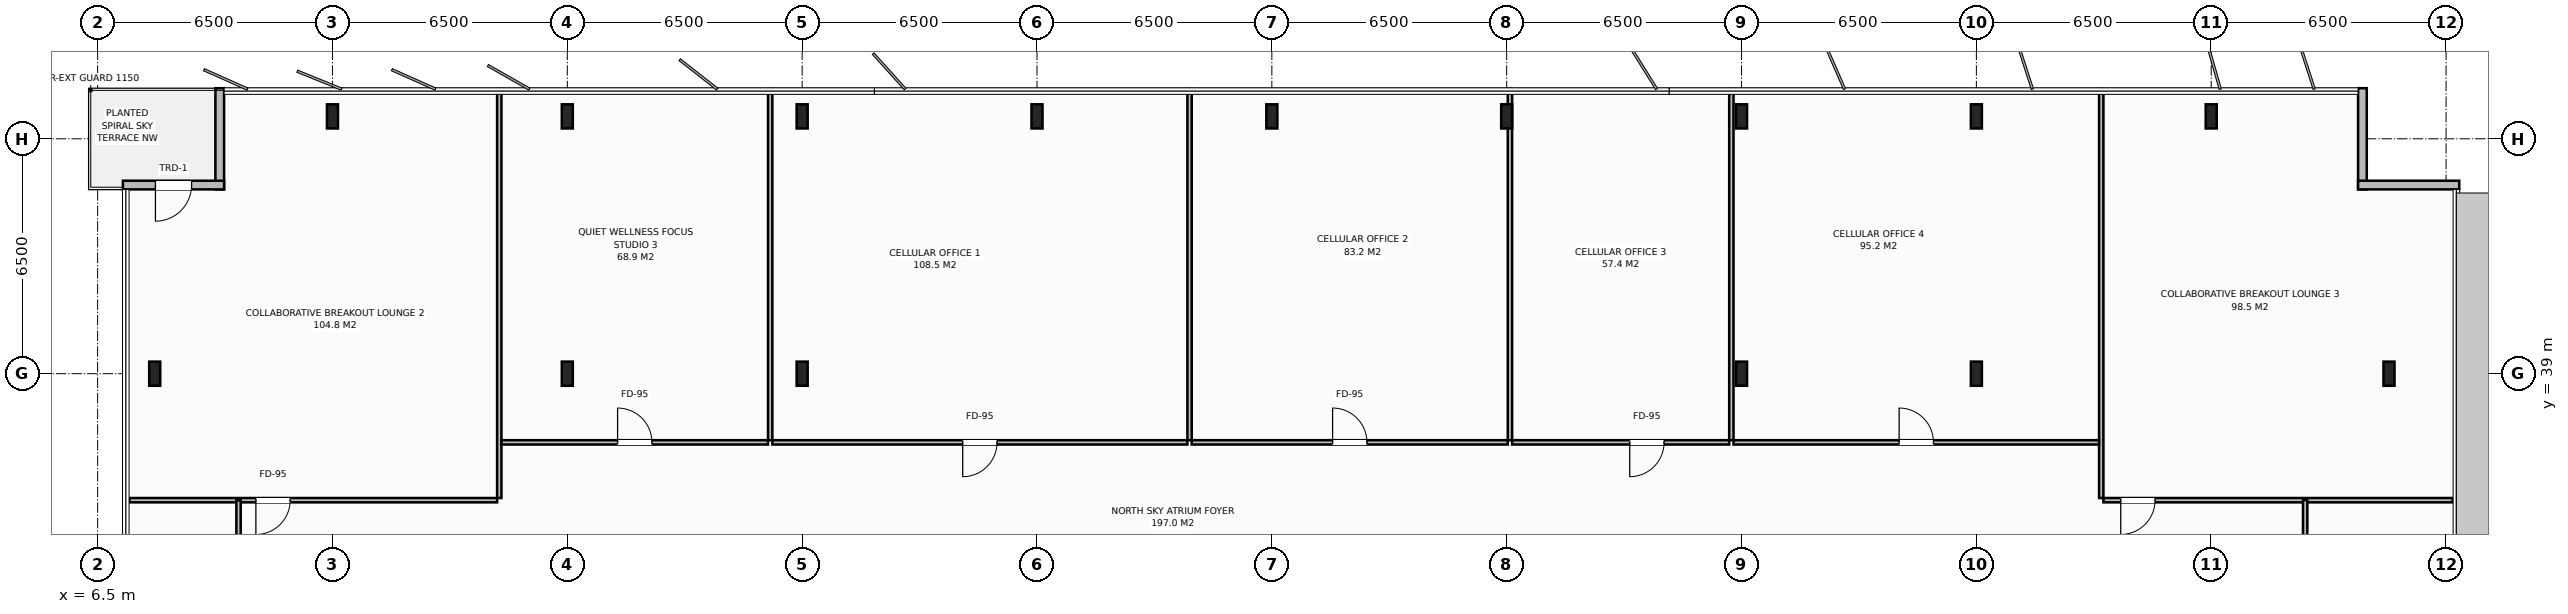
"""IFC4 building model, lengths in metres.
Left out: names, types, materials, properties, quantities, classifications, styles, units other than length and angle.
Written with IfcOpenShell. Run it as: python <this file> out.ifc"""

import sys

from ifc_helpers import new_model, si_unit, direction, frame, frame_2d, origin, origin_2d, place, context, subcontext, project, spatial, rectangle, i_section, extrude, element, fill, save


model = new_model("IFC4")
c1 = context("Model", 3, precision=1e-05, world=origin(), true_north=direction((0.0, 1.0)))
c2 = subcontext(c1, "Body", "Model", "MODEL_VIEW")
j1 = project(units=[si_unit("LENGTHUNIT", "METRE"), si_unit("PLANEANGLEUNIT", "RADIAN")], contexts=[c1])
p1 = place(None, origin())
s1 = spatial("IfcSite", under=j1, at=p1, CompositionType="ELEMENT")
p2 = place(p1, origin())
s2 = spatial("IfcBuilding", under=s1, at=p2, CompositionType="ELEMENT")
p3 = place(p2, frame((0.0, 0.0, 274.6)))
s3 = spatial("IfcBuildingStorey", under=s2, at=p3, CompositionType="ELEMENT", Elevation=274.6)
for number, where, z_axis, x_axis in (
    (1, (19.5, 39.0, 0.0), (0.0, 0.0, 1.0), (1.0, 0.0, 0.0)),
    (2, (58.5, 39.0, 0.0), (0.0, 0.0, 1.0), (1.0, 0.0, 0.0)),
    (3, (26.0, 39.0, 0.0), (0.0, 0.0, 1.0), (1.0, 0.0, 0.0)),
    (4, (52.0, 39.0, 0.0), (0.0, 0.0, 1.0), (1.0, 0.0, 0.0)),
    (5, (13.0, 46.12, 0.0), (0.0, 0.0, 1.0), (1.0, 0.0, 0.0)),
    (6, (19.5, 46.12, 0.0), (0.0, 0.0, 1.0), (1.0, 0.0, 0.0)),
    (7, (26.0, 46.12, 0.0), (0.0, 0.0, 1.0), (1.0, 0.0, 0.0)),
    (8, (32.5, 46.12, 0.0), (0.0, 0.0, 1.0), (1.0, 0.0, 0.0)),
    (9, (39.0, 46.12, 0.0), (0.0, 0.0, 1.0), (1.0, 0.0, 0.0)),
    (10, (45.5, 46.12, 0.0), (0.0, 0.0, 1.0), (1.0, 0.0, 0.0)),
    (11, (52.0, 46.12, 0.0), (0.0, 0.0, 1.0), (1.0, 0.0, 0.0)),
    (12, (58.5, 46.12, 0.0), (0.0, 0.0, 1.0), (1.0, 0.0, 0.0)),
    (13, (65.0, 46.12, 0.0), (0.0, 0.0, 1.0), (1.0, 0.0, 0.0)),
    (14, (8.08, 39.0, 0.0), (0.0, 0.0, 1.0), (1.0, 0.0, 0.0)),
    (15, (69.92, 39.0, 0.0), (0.0, 0.0, 1.0), (1.0, 0.0, 0.0)),
):
    element("IfcColumn", number, at=place(p3, frame(where, z_axis=z_axis, x_axis=x_axis)), inside=s3, PredefinedType="COLUMN", context=c2, shape_type="SweptSolid", body=[
        extrude(i_section(OverallWidth=0.305, OverallDepth=0.668, WebThickness=0.021, FlangeThickness=0.04, at=origin_2d()), origin(), (0.0, 0.0, 1.0), 3.8),
    ])
p4 = place(p3, frame((9.88, 44.1, 0.0), z_axis=(0.0, 0.0, 1.0), x_axis=(0.0, 1.0, 0.0)))
e16 = element("IfcWall", 16, at=p4, inside=s3, PredefinedType="STANDARD", context=c2, shape_type="SweptSolid", body=[
    extrude(rectangle(XDim=2.8, YDim=0.24, at=frame_2d((1.4, 0.0))), origin(), (0.0, 0.0, 1.0), 3.588),
])
p5 = place(p3, frame((7.2, 44.22, 0.0), z_axis=(0.0, 0.0, 1.0), x_axis=(1.0, 0.0, 0.0)))
e17 = element("IfcWall", 17, at=p5, inside=s3, PredefinedType="STANDARD", context=c2, shape_type="SweptSolid", body=[
    extrude(rectangle(XDim=2.8, YDim=0.24, at=frame_2d((1.4, 0.0))), origin(), (0.0, 0.0, 1.0), 3.588),
])
p6 = place(p5, frame((0.9, 0.0, 0.0)))
e18 = element("IfcOpeningElement", 18, at=p6, cuts=e17, PredefinedType="OPENING", context=c2, shape_type="SweptSolid", body=[
    extrude(rectangle(XDim=1.0, YDim=2.2, at=frame_2d((0.5, 1.1))), frame((0.0, 0.13, 0.0), z_axis=(0.0, -1.0, 0.0), x_axis=(1.0, 0.0, 0.0)), (0.0, 0.0, 1.0), 0.26),
])
p7 = place(p3, frame((69.185, 46.9, 0.0), z_axis=(0.0, 0.0, 1.0), x_axis=(0.0, -1.0, 0.0)))
e19 = element("IfcWall", 19, at=p7, inside=s3, PredefinedType="STANDARD", context=c2, shape_type="SweptSolid", body=[
    extrude(rectangle(XDim=2.8, YDim=0.24, at=frame_2d((1.4, 0.0))), origin(), (0.0, 0.0, 1.0), 3.588),
])
p8 = place(p3, frame((69.065, 44.22, 0.0), z_axis=(0.0, 0.0, 1.0), x_axis=(1.0, 0.0, 0.0)))
e20 = element("IfcWall", 20, at=p8, inside=s3, PredefinedType="STANDARD", context=c2, shape_type="SweptSolid", body=[
    extrude(rectangle(XDim=2.8, YDim=0.24, at=frame_2d((1.4, 0.0))), origin(), (0.0, 0.0, 1.0), 3.588),
])
p9 = place(p3, frame((17.617, 35.56, 0.0), z_axis=(0.0, 0.0, 1.0), x_axis=(0.0, 1.0, 0.0)))
e21 = element("IfcWall", 21, at=p9, inside=s3, PredefinedType="PARTITIONING", context=c2, shape_type="SweptSolid", body=[
    extrude(rectangle(XDim=11.32, YDim=0.12, at=frame_2d((5.66, 0.0))), origin(), (0.0, 0.0, 1.0), 3.588),
])
p10 = place(p3, frame((7.38, 35.5, 0.0), z_axis=(0.0, 0.0, 1.0), x_axis=(1.0, 0.0, 0.0)))
e22 = element("IfcWall", 22, at=p10, inside=s3, PredefinedType="PARTITIONING", context=c2, shape_type="SweptSolid", body=[
    extrude(rectangle(XDim=10.177, YDim=0.12, at=frame_2d((5.089, 0.0))), origin(), (0.0, 0.0, 1.0), 3.588),
])
p11 = place(p10, frame((3.5, 0.0, 0.0)))
e23 = element("IfcOpeningElement", 23, at=p11, cuts=e22, PredefinedType="OPENING", context=c2, shape_type="SweptSolid", body=[
    extrude(rectangle(XDim=0.95, YDim=2.15, at=frame_2d((0.475, 1.075))), frame((0.0, 0.07, 0.0), z_axis=(0.0, -1.0, 0.0), x_axis=(1.0, 0.0, 0.0)), (0.0, 0.0, 1.0), 0.14),
])
p12 = place(p3, frame((25.115, 37.16, 0.0), z_axis=(0.0, 0.0, 1.0), x_axis=(0.0, 1.0, 0.0)))
e24 = element("IfcWall", 24, at=p12, inside=s3, PredefinedType="PARTITIONING", context=c2, shape_type="SweptSolid", body=[
    extrude(rectangle(XDim=9.72, YDim=0.12, at=frame_2d((4.86, 0.0))), origin(), (0.0, 0.0, 1.0), 3.588),
])
p13 = place(p3, frame((17.677, 37.1, 0.0), z_axis=(0.0, 0.0, 1.0), x_axis=(1.0, 0.0, 0.0)))
e25 = element("IfcWall", 25, at=p13, inside=s3, PredefinedType="PARTITIONING", context=c2, shape_type="SweptSolid", body=[
    extrude(rectangle(XDim=7.378, YDim=0.12, at=frame_2d((3.689, 0.0))), origin(), (0.0, 0.0, 1.0), 3.588),
])
p14 = place(p13, frame((3.214, 0.0, 0.0)))
e26 = element("IfcOpeningElement", 26, at=p14, cuts=e25, PredefinedType="OPENING", context=c2, shape_type="SweptSolid", body=[
    extrude(rectangle(XDim=0.95, YDim=2.15, at=frame_2d((0.475, 1.075))), frame((0.0, 0.07, 0.0), z_axis=(0.0, -1.0, 0.0), x_axis=(1.0, 0.0, 0.0)), (0.0, 0.0, 1.0), 0.14),
])
p15 = place(p3, frame((36.722, 37.16, 0.0), z_axis=(0.0, 0.0, 1.0), x_axis=(0.0, 1.0, 0.0)))
e27 = element("IfcWall", 27, at=p15, inside=s3, PredefinedType="PARTITIONING", context=c2, shape_type="SweptSolid", body=[
    extrude(rectangle(XDim=9.72, YDim=0.12, at=frame_2d((4.86, 0.0))), origin(), (0.0, 0.0, 1.0), 3.588),
])
p16 = place(p3, frame((25.175, 37.1, 0.0), z_axis=(0.0, 0.0, 1.0), x_axis=(1.0, 0.0, 0.0)))
e28 = element("IfcWall", 28, at=p16, inside=s3, PredefinedType="PARTITIONING", context=c2, shape_type="SweptSolid", body=[
    extrude(rectangle(XDim=11.487, YDim=0.12, at=frame_2d((5.744, 0.0))), origin(), (0.0, 0.0, 1.0), 3.588),
])
p17 = place(p16, frame((5.269, 0.0, 0.0)))
e29 = element("IfcOpeningElement", 29, at=p17, cuts=e28, PredefinedType="OPENING", context=c2, shape_type="SweptSolid", body=[
    extrude(rectangle(XDim=0.95, YDim=2.15, at=frame_2d((0.475, 1.075))), frame((0.0, 0.07, 0.0), z_axis=(0.0, -1.0, 0.0), x_axis=(1.0, 0.0, 0.0)), (0.0, 0.0, 1.0), 0.14),
])
p18 = place(p3, frame((45.59, 37.16, 0.0), z_axis=(0.0, 0.0, 1.0), x_axis=(0.0, 1.0, 0.0)))
e30 = element("IfcWall", 30, at=p18, inside=s3, PredefinedType="PARTITIONING", context=c2, shape_type="SweptSolid", body=[
    extrude(rectangle(XDim=9.72, YDim=0.12, at=frame_2d((4.86, 0.0))), origin(), (0.0, 0.0, 1.0), 2.788),
])
p19 = place(p3, frame((36.782, 37.1, 0.0), z_axis=(0.0, 0.0, 1.0), x_axis=(1.0, 0.0, 0.0)))
e31 = element("IfcWall", 31, at=p19, inside=s3, PredefinedType="PARTITIONING", context=c2, shape_type="SweptSolid", body=[
    extrude(rectangle(XDim=8.748, YDim=0.12, at=frame_2d((4.374, 0.0))), origin(), (0.0, 0.0, 1.0), 3.588),
])
p20 = place(p19, frame((3.899, 0.0, 0.0)))
e32 = element("IfcOpeningElement", 32, at=p20, cuts=e31, PredefinedType="OPENING", context=c2, shape_type="SweptSolid", body=[
    extrude(rectangle(XDim=0.95, YDim=2.15, at=frame_2d((0.475, 1.075))), frame((0.0, 0.07, 0.0), z_axis=(0.0, -1.0, 0.0), x_axis=(1.0, 0.0, 0.0)), (0.0, 0.0, 1.0), 0.14),
])
p21 = place(p3, frame((51.718, 37.16, 0.0), z_axis=(0.0, 0.0, 1.0), x_axis=(0.0, 1.0, 0.0)))
e33 = element("IfcWall", 33, at=p21, inside=s3, PredefinedType="PARTITIONING", context=c2, shape_type="SweptSolid", body=[
    extrude(rectangle(XDim=9.72, YDim=0.12, at=frame_2d((4.86, 0.0))), origin(), (0.0, 0.0, 1.0), 3.588),
])
p22 = place(p3, frame((45.65, 37.1, 0.0), z_axis=(0.0, 0.0, 1.0), x_axis=(1.0, 0.0, 0.0)))
e34 = element("IfcWall", 34, at=p22, inside=s3, PredefinedType="PARTITIONING", context=c2, shape_type="SweptSolid", body=[
    extrude(rectangle(XDim=6.008, YDim=0.12, at=frame_2d((3.004, 0.0))), origin(), (0.0, 0.0, 1.0), 3.588),
])
p23 = place(p22, frame((3.256, 0.0, 0.0)))
e35 = element("IfcOpeningElement", 35, at=p23, cuts=e34, PredefinedType="OPENING", context=c2, shape_type="SweptSolid", body=[
    extrude(rectangle(XDim=0.95, YDim=2.15, at=frame_2d((0.475, 1.075))), frame((0.0, 0.07, 0.0), z_axis=(0.0, -1.0, 0.0), x_axis=(1.0, 0.0, 0.0)), (0.0, 0.0, 1.0), 0.14),
])
p24 = place(p3, frame((61.956, 35.56, 0.0), z_axis=(0.0, 0.0, 1.0), x_axis=(0.0, 1.0, 0.0)))
e36 = element("IfcWall", 36, at=p24, inside=s3, PredefinedType="PARTITIONING", context=c2, shape_type="SweptSolid", body=[
    extrude(rectangle(XDim=11.32, YDim=0.12, at=frame_2d((5.66, 0.0))), origin(), (0.0, 0.0, 1.0), 3.588),
])
p25 = place(p3, frame((51.778, 37.1, 0.0), z_axis=(0.0, 0.0, 1.0), x_axis=(1.0, 0.0, 0.0)))
e37 = element("IfcWall", 37, at=p25, inside=s3, PredefinedType="PARTITIONING", context=c2, shape_type="SweptSolid", body=[
    extrude(rectangle(XDim=10.117, YDim=0.12, at=frame_2d((5.059, 0.0))), origin(), (0.0, 0.0, 1.0), 3.588),
])
p26 = place(p25, frame((4.584, 0.0, 0.0)))
e38 = element("IfcOpeningElement", 38, at=p26, cuts=e37, PredefinedType="OPENING", context=c2, shape_type="SweptSolid", body=[
    extrude(rectangle(XDim=0.95, YDim=2.15, at=frame_2d((0.475, 1.075))), frame((0.0, 0.07, 0.0), z_axis=(0.0, -1.0, 0.0), x_axis=(1.0, 0.0, 0.0)), (0.0, 0.0, 1.0), 0.14),
])
p27 = place(p3, frame((62.016, 35.5, 0.0), z_axis=(0.0, 0.0, 1.0), x_axis=(1.0, 0.0, 0.0)))
e39 = element("IfcWall", 39, at=p27, inside=s3, PredefinedType="PARTITIONING", context=c2, shape_type="SweptSolid", body=[
    extrude(rectangle(XDim=9.669, YDim=0.12, at=frame_2d((4.834, 0.0))), origin(), (0.0, 0.0, 1.0), 3.588),
])
p28 = place(p27, frame((0.48, 0.0, 0.0)))
e40 = element("IfcOpeningElement", 40, at=p28, cuts=e39, PredefinedType="OPENING", context=c2, shape_type="SweptSolid", body=[
    extrude(rectangle(XDim=0.95, YDim=2.15, at=frame_2d((0.475, 1.075))), frame((0.0, 0.07, 0.0), z_axis=(0.0, -1.0, 0.0), x_axis=(1.0, 0.0, 0.0)), (0.0, 0.0, 1.0), 0.14),
])
p29 = place(p3, frame((10.4, 16.5, 0.0), z_axis=(0.0, 0.0, 1.0), x_axis=(0.0, 1.0, 0.0)))
e41 = element("IfcWall", 41, at=p29, inside=s3, PredefinedType="PARTITIONING", context=c2, shape_type="SweptSolid", body=[
    extrude(rectangle(XDim=19.0, YDim=0.12, at=frame_2d((9.5, 0.0))), origin(), (0.0, 0.0, 1.0), 3.588),
])
p30 = place(p29, frame((9.025, 0.0, 0.0)))
e42 = element("IfcOpeningElement", 42, at=p30, cuts=e41, PredefinedType="OPENING", context=c2, shape_type="SweptSolid", body=[
    extrude(rectangle(XDim=0.95, YDim=2.15, at=frame_2d((0.475, 1.075))), frame((0.0, 0.07, 0.0), z_axis=(0.0, -1.0, 0.0), x_axis=(1.0, 0.0, 0.0)), (0.0, 0.0, 1.0), 0.14),
])
p31 = place(p3, frame((67.6, 27.05, 0.0), z_axis=(0.0, 0.0, 1.0), x_axis=(0.0, 1.0, 0.0)))
e43 = element("IfcWall", 43, at=p31, inside=s3, PredefinedType="PARTITIONING", context=c2, shape_type="SweptSolid", body=[
    extrude(rectangle(XDim=8.45, YDim=0.12, at=frame_2d((4.225, 0.0))), origin(), (0.0, 0.0, 1.0), 3.588),
])
p32 = place(p31, frame((2.7, 0.0, 0.0)))
e44 = element("IfcOpeningElement", 44, at=p32, cuts=e43, PredefinedType="OPENING", context=c2, shape_type="SweptSolid", body=[
    extrude(rectangle(XDim=0.95, YDim=2.15, at=frame_2d((0.475, 1.075))), frame((0.0, 0.07, 0.0), z_axis=(0.0, -1.0, 0.0), x_axis=(1.0, 0.0, 0.0)), (0.0, 0.0, 1.0), 0.14),
])
p33 = place(p6, origin())
e45 = element("IfcDoor", 45, at=p33, inside=s3, OperationType="SINGLE_SWING_RIGHT", PredefinedType="DOOR", context=c2, shape_type="SweptSolid", body=[
    extrude(rectangle(XDim=1.0, YDim=2.2, at=frame_2d((0.5, 1.1))), frame((0.0, 0.025, 0.0), z_axis=(0.0, -1.0, 0.0), x_axis=(1.0, 0.0, 0.0)), (0.0, 0.0, 1.0), 0.05),
])
fill(e18, e45)
p34 = place(p11, origin())
e46 = element("IfcDoor", 46, at=p34, inside=s3, OperationType="SINGLE_SWING_RIGHT", PredefinedType="DOOR", context=c2, shape_type="SweptSolid", body=[
    extrude(rectangle(XDim=0.95, YDim=2.15, at=frame_2d((0.475, 1.075))), frame((0.0, 0.025, 0.0), z_axis=(0.0, -1.0, 0.0), x_axis=(1.0, 0.0, 0.0)), (0.0, 0.0, 1.0), 0.05),
])
fill(e23, e46)
p35 = place(p14, origin())
e47 = element("IfcDoor", 47, at=p35, inside=s3, OperationType="SINGLE_SWING_LEFT", PredefinedType="DOOR", context=c2, shape_type="SweptSolid", body=[
    extrude(rectangle(XDim=0.95, YDim=2.15, at=frame_2d((0.475, 1.075))), frame((0.0, 0.025, 0.0), z_axis=(0.0, -1.0, 0.0), x_axis=(1.0, 0.0, 0.0)), (0.0, 0.0, 1.0), 0.05),
])
fill(e26, e47)
p36 = place(p17, origin())
e48 = element("IfcDoor", 48, at=p36, inside=s3, OperationType="SINGLE_SWING_RIGHT", PredefinedType="DOOR", context=c2, shape_type="SweptSolid", body=[
    extrude(rectangle(XDim=0.95, YDim=2.15, at=frame_2d((0.475, 1.075))), frame((0.0, 0.025, 0.0), z_axis=(0.0, -1.0, 0.0), x_axis=(1.0, 0.0, 0.0)), (0.0, 0.0, 1.0), 0.05),
])
fill(e29, e48)
p37 = place(p20, origin())
e49 = element("IfcDoor", 49, at=p37, inside=s3, OperationType="SINGLE_SWING_LEFT", PredefinedType="DOOR", context=c2, shape_type="SweptSolid", body=[
    extrude(rectangle(XDim=0.95, YDim=2.15, at=frame_2d((0.475, 1.075))), frame((0.0, 0.025, 0.0), z_axis=(0.0, -1.0, 0.0), x_axis=(1.0, 0.0, 0.0)), (0.0, 0.0, 1.0), 0.05),
])
fill(e32, e49)
p38 = place(p23, origin())
e50 = element("IfcDoor", 50, at=p38, inside=s3, OperationType="SINGLE_SWING_RIGHT", PredefinedType="DOOR", context=c2, shape_type="SweptSolid", body=[
    extrude(rectangle(XDim=0.95, YDim=2.15, at=frame_2d((0.475, 1.075))), frame((0.0, 0.025, 0.0), z_axis=(0.0, -1.0, 0.0), x_axis=(1.0, 0.0, 0.0)), (0.0, 0.0, 1.0), 0.05),
])
fill(e35, e50)
p39 = place(p26, origin())
e51 = element("IfcDoor", 51, at=p39, inside=s3, OperationType="SINGLE_SWING_LEFT", PredefinedType="DOOR", context=c2, shape_type="SweptSolid", body=[
    extrude(rectangle(XDim=0.95, YDim=2.15, at=frame_2d((0.475, 1.075))), frame((0.0, 0.025, 0.0), z_axis=(0.0, -1.0, 0.0), x_axis=(1.0, 0.0, 0.0)), (0.0, 0.0, 1.0), 0.05),
])
fill(e38, e51)
p40 = place(p28, origin())
e52 = element("IfcDoor", 52, at=p40, inside=s3, OperationType="SINGLE_SWING_RIGHT", PredefinedType="DOOR", context=c2, shape_type="SweptSolid", body=[
    extrude(rectangle(XDim=0.95, YDim=2.15, at=frame_2d((0.475, 1.075))), frame((0.0, 0.025, 0.0), z_axis=(0.0, -1.0, 0.0), x_axis=(1.0, 0.0, 0.0)), (0.0, 0.0, 1.0), 0.05),
])
fill(e40, e52)
save(model, sys.argv[1])
